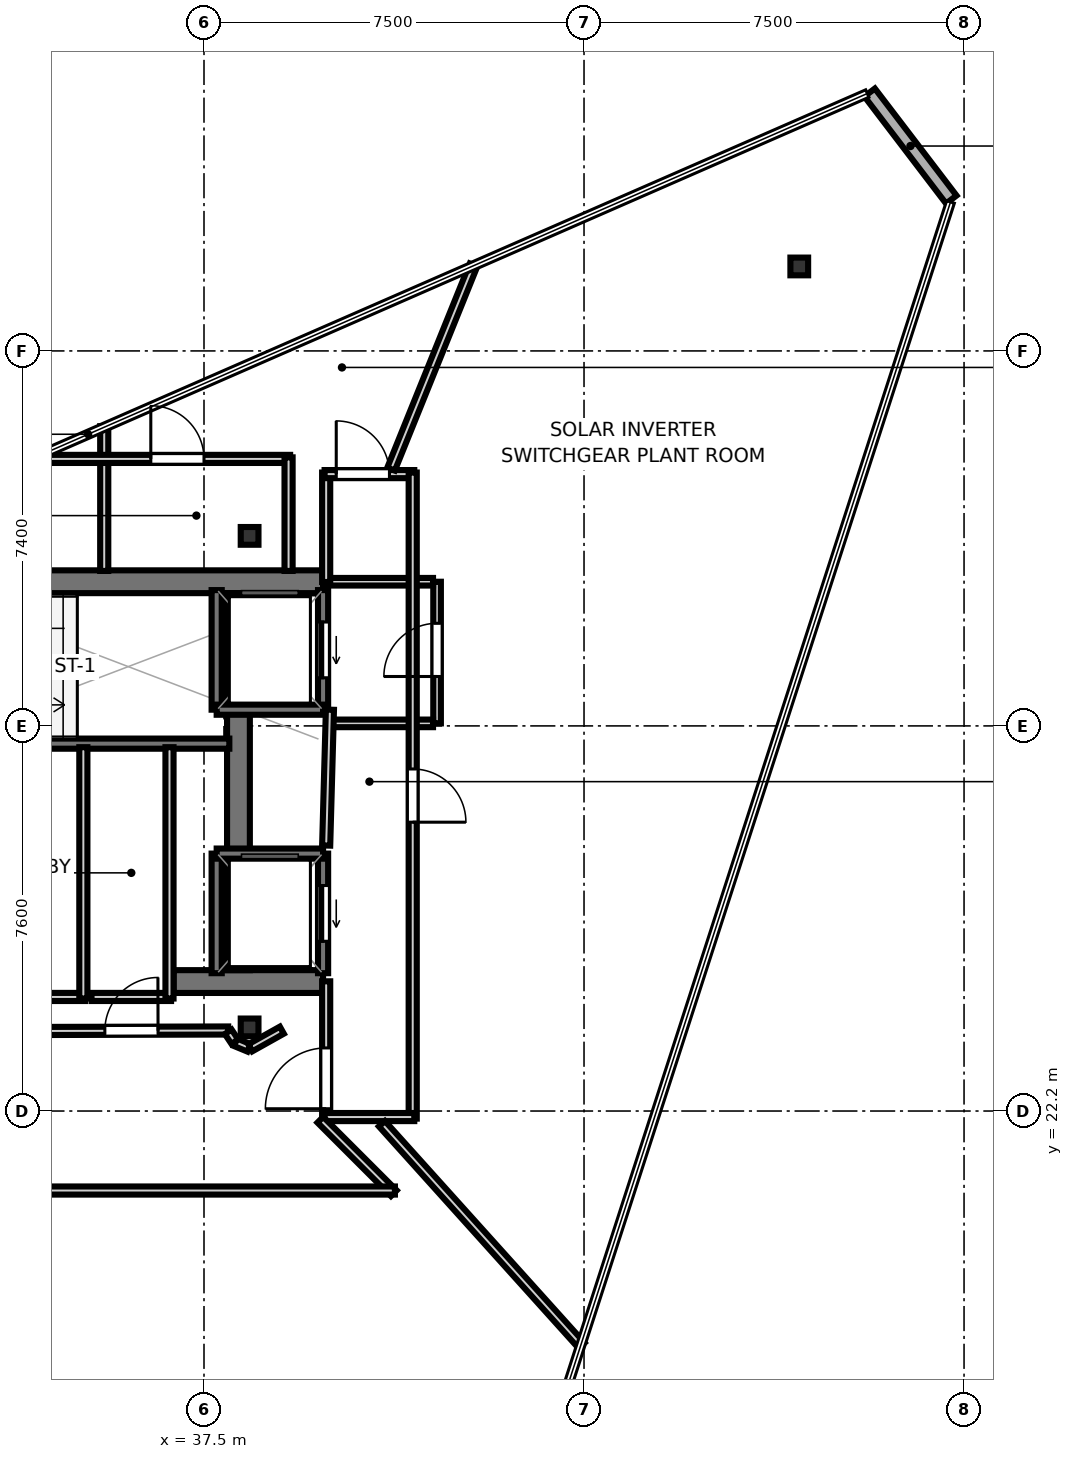
"""IFC4 building model, lengths in metres.
Left out: names, types, materials, properties, quantities, classifications, styles, units other than length and angle.
Written with IfcOpenShell. Run it as: python <this file> out.ifc"""

import sys

from ifc_helpers import new_model, si_unit, direction, frame, frame_2d, origin, origin_2d, place, context, subcontext, project, spatial, rectangle, i_section, extrude, element, fill, save


model = new_model("IFC4")
c1 = context("Model", 3, precision=1e-05, world=origin(), true_north=direction((0.0, 1.0)))
c2 = subcontext(c1, "Body", "Model", "MODEL_VIEW")
j1 = project(units=[si_unit("LENGTHUNIT", "METRE"), si_unit("PLANEANGLEUNIT", "RADIAN")], contexts=[c1])
p1 = place(None, origin())
s1 = spatial("IfcSite", under=j1, at=p1, CompositionType="ELEMENT")
p2 = place(p1, origin())
s2 = spatial("IfcBuilding", under=s1, at=p2, CompositionType="ELEMENT")
p3 = place(p2, frame((0.0, 0.0, 363.8)))
s3 = spatial("IfcBuildingStorey", under=s2, at=p3, CompositionType="ELEMENT", Elevation=363.8)
p4 = place(p3, frame((29.83, 32.645, 0.0), z_axis=(0.0, 0.0, 1.0), x_axis=(1.0, 0.0, 0.0)))
e1 = element("IfcWall", 1, at=p4, inside=s3, PredefinedType="SHEAR", context=c2, shape_type="SweptSolid", body=[
    extrude(rectangle(XDim=10.02, YDim=0.45, at=frame_2d((5.01, 0.0))), origin(), (0.0, 0.0, 1.0), 3.55),
])
p5 = place(p3, frame((36.9, 24.755, 0.0), z_axis=(0.0, 0.0, 1.0), x_axis=(1.0, 0.0, 0.0)))
e2 = element("IfcWall", 2, at=p5, inside=s3, PredefinedType="SHEAR", context=c2, shape_type="SweptSolid", body=[
    extrude(rectangle(XDim=2.95, YDim=0.45, at=frame_2d((1.475, 0.0))), origin(), (0.0, 0.0, 1.0), 3.55),
])
p6 = place(p3, frame((38.18, 24.98, 0.0), z_axis=(0.0, 0.0, 1.0), x_axis=(0.0, 1.0, 0.0)))
e3 = element("IfcWall", 3, at=p6, inside=s3, PredefinedType="SHEAR", context=c2, shape_type="SweptSolid", body=[
    extrude(rectangle(XDim=7.44, YDim=0.45, at=frame_2d((3.72, 0.0))), origin(), (0.0, 0.0, 1.0), 3.55),
])
for number, where, z_axis, x_axis in (
    (4, (38.4, 33.55, 0.0), (0.0, 0.0, 1.0), (1.0, 0.0, 0.0)),
    (5, (38.4, 23.85, 0.0), (0.0, 0.0, 1.0), (1.0, 0.0, 0.0)),
    (6, (49.248, 38.867, 0.0), (0.0, 0.0, 1.0), (1.0, 0.0, 0.0)),
):
    element("IfcColumn", number, at=place(p3, frame(where, z_axis=z_axis, x_axis=x_axis)), inside=s3, PredefinedType="COLUMN", context=c2, shape_type="SweptSolid", body=[
        extrude(i_section(OverallWidth=0.35, OverallDepth=0.35, WebThickness=0.012, FlangeThickness=0.019, at=origin_2d()), origin(), (0.0, 0.0, 1.0), 3.75),
    ])
p7 = place(p3, frame((52.248, 40.187, 0.0), z_axis=(0.0, 0.0, 1.0), x_axis=(-0.606477726375, 0.795100476299, 0.0)))
e7 = element("IfcWall", 7, at=p7, inside=s3, PredefinedType="SOLIDWALL", context=c2, shape_type="SweptSolid", body=[
    extrude(rectangle(XDim=2.657, YDim=0.26, at=frame_2d((1.329, 0.0))), origin(), (0.0, 0.0, 1.0), 3.55),
])
p8 = place(p3, frame((29.7, 29.45, 0.0), z_axis=(0.0, 0.0, 1.0), x_axis=(1.0, 0.0, 0.0)))
e8 = element("IfcWall", 8, at=p8, inside=s3, PredefinedType="SOLIDWALL", context=c2, shape_type="SweptSolid", body=[
    extrude(rectangle(XDim=8.3, YDim=0.2, at=frame_2d((4.15, 0.0))), origin(), (0.0, 0.0, 1.0), 3.55),
])
p9 = place(p8, frame((0.595, 0.0, 0.0)))
e9 = element("IfcOpeningElement", 9, at=p9, cuts=e8, PredefinedType="OPENING", context=c2, shape_type="SweptSolid", body=[
    extrude(rectangle(XDim=1.25, YDim=2.15, at=frame_2d((0.625, 1.075))), frame((0.0, 0.11, 0.0), z_axis=(0.0, -1.0, 0.0), x_axis=(1.0, 0.0, 0.0)), (0.0, 0.0, 1.0), 0.22),
])
p10 = place(p3, frame((39.85, 30.12, 0.0), z_axis=(0.0, 0.0, 1.0), x_axis=(0.0, 1.0, 0.0)))
e10 = element("IfcWall", 10, at=p10, inside=s3, PredefinedType="SOLIDWALL", context=c2, shape_type="SweptSolid", body=[
    extrude(rectangle(XDim=2.36, YDim=0.2, at=frame_2d((1.18, 0.0))), origin(), (0.0, 0.0, 1.0), 3.55),
])
p11 = place(p10, frame((0.63, 0.0, 0.0)))
e11 = element("IfcOpeningElement", 11, at=p11, cuts=e10, PredefinedType="OPENING", context=c2, shape_type="SweptSolid", body=[
    extrude(rectangle(XDim=1.1, YDim=2.15, at=frame_2d((0.55, 1.075))), frame((0.0, 0.11, 0.0), z_axis=(0.0, -1.0, 0.0), x_axis=(1.0, 0.0, 0.0)), (0.0, 0.0, 1.0), 0.22),
])
p12 = place(p3, frame((37.75, 30.12, 0.0), z_axis=(0.0, 0.0, 1.0), x_axis=(0.0, 1.0, 0.0)))
e12 = element("IfcWall", 12, at=p12, inside=s3, PredefinedType="SOLIDWALL", context=c2, shape_type="SweptSolid", body=[
    extrude(rectangle(XDim=2.36, YDim=0.2, at=frame_2d((1.18, 0.0))), origin(), (0.0, 0.0, 1.0), 3.55),
])
p13 = place(p3, frame((37.75, 30.12, 0.0), z_axis=(0.0, 0.0, 1.0), x_axis=(1.0, 0.0, 0.0)))
e13 = element("IfcWall", 13, at=p13, inside=s3, PredefinedType="SOLIDWALL", context=c2, shape_type="SweptSolid", body=[
    extrude(rectangle(XDim=2.1, YDim=0.2, at=frame_2d((1.05, 0.0))), origin(), (0.0, 0.0, 1.0), 3.55),
])
p14 = place(p3, frame((39.85, 24.92, 0.0), z_axis=(0.0, 0.0, 1.0), x_axis=(0.0, 1.0, 0.0)))
e14 = element("IfcWall", 14, at=p14, inside=s3, PredefinedType="SOLIDWALL", context=c2, shape_type="SweptSolid", body=[
    extrude(rectangle(XDim=2.36, YDim=0.2, at=frame_2d((1.18, 0.0))), origin(), (0.0, 0.0, 1.0), 3.55),
])
p15 = place(p14, frame((0.63, 0.0, 0.0)))
e15 = element("IfcOpeningElement", 15, at=p15, cuts=e14, PredefinedType="OPENING", context=c2, shape_type="SweptSolid", body=[
    extrude(rectangle(XDim=1.1, YDim=2.15, at=frame_2d((0.55, 1.075))), frame((0.0, 0.11, 0.0), z_axis=(0.0, -1.0, 0.0), x_axis=(1.0, 0.0, 0.0)), (0.0, 0.0, 1.0), 0.22),
])
p16 = place(p3, frame((37.75, 24.92, 0.0), z_axis=(0.0, 0.0, 1.0), x_axis=(0.0, 1.0, 0.0)))
e16 = element("IfcWall", 16, at=p16, inside=s3, PredefinedType="SOLIDWALL", context=c2, shape_type="SweptSolid", body=[
    extrude(rectangle(XDim=2.36, YDim=0.2, at=frame_2d((1.18, 0.0))), origin(), (0.0, 0.0, 1.0), 3.55),
])
p17 = place(p3, frame((37.75, 27.28, 0.0), z_axis=(0.0, 0.0, 1.0), x_axis=(1.0, 0.0, 0.0)))
e17 = element("IfcWall", 17, at=p17, inside=s3, PredefinedType="SOLIDWALL", context=c2, shape_type="SweptSolid", body=[
    extrude(rectangle(XDim=2.1, YDim=0.2, at=frame_2d((1.05, 0.0))), origin(), (0.0, 0.0, 1.0), 3.55),
])
p18 = place(p3, frame((42.1, 29.85, 0.0), z_axis=(0.0, 0.0, 1.0), x_axis=(0.0, 1.0, 0.0)))
e18 = element("IfcWall", 18, at=p18, inside=s3, PredefinedType="PARTITIONING", context=c2, shape_type="SweptSolid", body=[
    extrude(rectangle(XDim=2.795, YDim=0.15, at=frame_2d((1.397, 0.0))), origin(), (0.0, 0.0, 1.0), 2.87),
])
p19 = place(p18, frame((0.925, 0.0, 0.0)))
e19 = element("IfcOpeningElement", 19, at=p19, cuts=e18, PredefinedType="OPENING", context=c2, shape_type="SweptSolid", body=[
    extrude(rectangle(XDim=1.05, YDim=2.15, at=frame_2d((0.525, 1.075))), frame((0.0, 0.085, 0.0), z_axis=(0.0, -1.0, 0.0), x_axis=(1.0, 0.0, 0.0)), (0.0, 0.0, 1.0), 0.17),
])
for number, where, z_axis, x_axis in (
    (20, (39.96, 29.85, 0.0), (0.0, 0.0, 1.0), (1.0, 0.0, 0.0)),
    (21, (39.96, 32.645, 0.0), (0.0, 0.0, 1.0), (1.0, 0.0, 0.0)),
):
    element("IfcWall", number, at=place(p3, frame(where, z_axis=z_axis, x_axis=x_axis)), inside=s3, PredefinedType="PARTITIONING", context=c2, shape_type="SweptSolid", body=[
        extrude(rectangle(XDim=2.06, YDim=0.15, at=frame_2d((1.03, 0.0))), origin(), (0.0, 0.0, 1.0), 2.87),
    ])
p20 = place(p3, frame((35.15, 24.451, 0.0), z_axis=(0.0, 0.0, 1.0), x_axis=(-1.0, 0.0, 0.0)))
e22 = element("IfcWall", 22, at=p20, inside=s3, PredefinedType="PARTITIONING", context=c2, shape_type="SweptSolid", body=[
    extrude(rectangle(XDim=5.55, YDim=0.16, at=frame_2d((2.775, 0.0))), origin(), (0.0, 0.0, 1.0), 2.87),
])
p21 = place(p3, frame((35.119, 29.38, 0.0), z_axis=(0.0, 0.0, 1.0), x_axis=(0.0, -1.0, 0.0)))
e23 = element("IfcWall", 23, at=p21, inside=s3, PredefinedType="PARTITIONING", context=c2, shape_type="SweptSolid", body=[
    extrude(rectangle(XDim=4.96, YDim=0.16, at=frame_2d((2.48, 0.0))), origin(), (0.0, 0.0, 1.0), 2.08),
])
p22 = place(p3, frame((39.911, 22.05, 0.0), z_axis=(0.0, 0.0, 1.0), x_axis=(0.0, 1.0, 0.0)))
e24 = element("IfcWall", 24, at=p22, inside=s3, PredefinedType="PARTITIONING", context=c2, shape_type="SweptSolid", body=[
    extrude(rectangle(XDim=2.71, YDim=0.16, at=frame_2d((1.355, 0.0))), origin(), (0.0, 0.0, 1.0), 2.87),
])
p23 = place(p22, frame((0.195, 0.0, 0.0)))
e25 = element("IfcOpeningElement", 25, at=p23, cuts=e24, PredefinedType="OPENING", context=c2, shape_type="SweptSolid", body=[
    extrude(rectangle(XDim=1.2, YDim=2.15, at=frame_2d((0.6, 1.075))), frame((0.0, 0.09, 0.0), z_axis=(0.0, -1.0, 0.0), x_axis=(1.0, 0.0, 0.0)), (0.0, 0.0, 1.0), 0.18),
])
p24 = place(p3, frame((39.911, 27.439, 0.0), z_axis=(0.0, 0.0, 1.0), x_axis=(0.027673579092, 0.999617013171, 0.0)))
e26 = element("IfcWall", 26, at=p24, inside=s3, PredefinedType="PARTITIONING", context=c2, shape_type="SweptSolid", body=[
    extrude(rectangle(XDim=2.682, YDim=0.16, at=frame_2d((1.341, 0.0))), origin(), (0.0, 0.0, 1.0), 2.87),
])
p25 = place(p3, frame((39.911, 32.64, 0.0), z_axis=(0.0, 0.0, 1.0), x_axis=(0.0, 1.0, 0.0)))
e27 = element("IfcWall", 27, at=p25, inside=s3, PredefinedType="PARTITIONING", context=c2, shape_type="SweptSolid", body=[
    extrude(rectangle(XDim=2.16, YDim=0.16, at=frame_2d((1.08, 0.0))), origin(), (0.0, 0.0, 1.0), 2.87),
])
p26 = place(p3, frame((39.88, 34.769, 0.0), z_axis=(0.0, 0.0, 1.0), x_axis=(1.0, 0.0, 0.0)))
e28 = element("IfcWall", 28, at=p26, inside=s3, PredefinedType="PARTITIONING", context=c2, shape_type="SweptSolid", body=[
    extrude(rectangle(XDim=1.77, YDim=0.16, at=frame_2d((0.885, 0.0))), origin(), (0.0, 0.0, 1.0), 2.87),
])
p27 = place(p26, frame((0.23, 0.0, 0.0)))
e29 = element("IfcOpeningElement", 29, at=p27, cuts=e28, PredefinedType="OPENING", context=c2, shape_type="SweptSolid", body=[
    extrude(rectangle(XDim=1.05, YDim=2.15, at=frame_2d((0.525, 1.075))), frame((0.0, 0.09, 0.0), z_axis=(0.0, -1.0, 0.0), x_axis=(1.0, 0.0, 0.0)), (0.0, 0.0, 1.0), 0.18),
])
p28 = place(p3, frame((41.619, 34.8, 0.0), z_axis=(0.0, 0.0, 1.0), x_axis=(0.0, -1.0, 0.0)))
e30 = element("IfcWall", 30, at=p28, inside=s3, PredefinedType="PARTITIONING", context=c2, shape_type="SweptSolid", body=[
    extrude(rectangle(XDim=12.75, YDim=0.16, at=frame_2d((6.375, 0.0))), origin(), (0.0, 0.0, 1.0), 2.87),
])
p29 = place(p28, frame((5.85, 0.0, 0.0)))
e31 = element("IfcOpeningElement", 31, at=p29, cuts=e30, PredefinedType="OPENING", context=c2, shape_type="SweptSolid", body=[
    extrude(rectangle(XDim=1.05, YDim=2.15, at=frame_2d((0.525, 1.075))), frame((0.0, 0.09, 0.0), z_axis=(0.0, -1.0, 0.0), x_axis=(1.0, 0.0, 0.0)), (0.0, 0.0, 1.0), 0.18),
])
p30 = place(p3, frame((41.65, 22.081, 0.0), z_axis=(0.0, 0.0, 1.0), x_axis=(-1.0, 0.0, 0.0)))
e32 = element("IfcWall", 32, at=p30, inside=s3, PredefinedType="PARTITIONING", context=c2, shape_type="SweptSolid", body=[
    extrude(rectangle(XDim=1.77, YDim=0.16, at=frame_2d((0.885, 0.0))), origin(), (0.0, 0.0, 1.0), 2.87),
])
p31 = place(p3, frame((36.85, 24.451, 0.0), z_axis=(0.0, 0.0, 1.0), x_axis=(-1.0, 0.0, 0.0)))
e33 = element("IfcWall", 33, at=p31, inside=s3, PredefinedType="PARTITIONING", context=c2, shape_type="SweptSolid", body=[
    extrude(rectangle(XDim=1.57, YDim=0.16, at=frame_2d((0.785, 0.0))), origin(), (0.0, 0.0, 1.0), 2.87),
])
p32 = place(p3, frame((36.819, 29.38, 0.0), z_axis=(0.0, 0.0, 1.0), x_axis=(0.0, -1.0, 0.0)))
e34 = element("IfcWall", 34, at=p32, inside=s3, PredefinedType="PARTITIONING", context=c2, shape_type="SweptSolid", body=[
    extrude(rectangle(XDim=4.96, YDim=0.16, at=frame_2d((2.48, 0.0))), origin(), (0.0, 0.0, 1.0), 2.87),
])
p33 = place(p3, frame((35.531, 32.858, 0.0), z_axis=(0.0, 0.0, 1.0), x_axis=(0.0, 1.0, 0.0)))
e35 = element("IfcWall", 35, at=p33, inside=s3, PredefinedType="PARTITIONING", context=c2, shape_type="SweptSolid", body=[
    extrude(rectangle(XDim=2.856, YDim=0.16, at=frame_2d((1.428, 0.0))), origin(), (0.0, 0.0, 1.0), 2.87),
])
p34 = place(p3, frame((34.081, 35.069, 0.0), z_axis=(0.0, 0.0, 1.0), x_axis=(1.0, 0.0, 0.0)))
e36 = element("IfcWall", 36, at=p34, inside=s3, PredefinedType="PARTITIONING", context=c2, shape_type="SweptSolid", body=[
    extrude(rectangle(XDim=5.119, YDim=0.16, at=frame_2d((2.56, 0.0))), origin(), (0.0, 0.0, 1.0), 2.87),
])
p35 = place(p34, frame((2.369, 0.0, 0.0)))
e37 = element("IfcOpeningElement", 37, at=p35, cuts=e36, PredefinedType="OPENING", context=c2, shape_type="SweptSolid", body=[
    extrude(rectangle(XDim=1.05, YDim=2.15, at=frame_2d((0.525, 1.075))), frame((0.0, 0.09, 0.0), z_axis=(0.0, -1.0, 0.0), x_axis=(1.0, 0.0, 0.0)), (0.0, 0.0, 1.0), 0.18),
])
p36 = place(p3, frame((39.169, 35.1, 0.0), z_axis=(0.0, 0.0, 1.0), x_axis=(0.0, -1.0, 0.0)))
e38 = element("IfcWall", 38, at=p36, inside=s3, PredefinedType="PARTITIONING", context=c2, shape_type="SweptSolid", body=[
    extrude(rectangle(XDim=2.242, YDim=0.16, at=frame_2d((1.121, 0.0))), origin(), (0.0, 0.0, 1.0), 2.87),
])
p37 = place(p3, frame((29.184, 23.767, 0.0), z_axis=(0.0, 0.0, 1.0), x_axis=(0.999996878137, 0.002498742824, 0.0)))
e39 = element("IfcWall", 39, at=p37, inside=s3, PredefinedType="PARTITIONING", context=c2, shape_type="SweptSolid", body=[
    extrude(rectangle(XDim=8.793, YDim=0.16, at=frame_2d((4.397, 0.0))), origin(), (0.0, 0.0, 1.0), 2.87),
])
p38 = place(p37, frame((2.831, 0.0, 0.0)))
e40 = element("IfcOpeningElement", 40, at=p38, cuts=e39, PredefinedType="OPENING", context=c2, shape_type="SweptSolid", body=[
    extrude(rectangle(XDim=1.2, YDim=2.15, at=frame_2d((0.6, 1.075))), frame((0.0, 0.09, 0.0), z_axis=(0.0, -1.0, 0.0), x_axis=(1.0, 0.0, 0.0)), (0.0, 0.0, 1.0), 0.18),
])
p39 = place(p37, frame((6.359, 0.0, 0.0)))
e41 = element("IfcOpeningElement", 41, at=p39, cuts=e39, PredefinedType="OPENING", context=c2, shape_type="SweptSolid", body=[
    extrude(rectangle(XDim=1.05, YDim=2.15, at=frame_2d((0.525, 1.075))), frame((0.0, 0.09, 0.0), z_axis=(0.0, -1.0, 0.0), x_axis=(1.0, 0.0, 0.0)), (0.0, 0.0, 1.0), 0.18),
])
p40 = place(p37, frame((1.431, 0.0, 0.0)))
e42 = element("IfcOpeningElement", 42, at=p40, cuts=e39, PredefinedType="OPENING", context=c2, shape_type="SweptSolid", body=[
    extrude(rectangle(XDim=1.2, YDim=2.15, at=frame_2d((0.6, 1.075))), frame((0.0, 0.09, 0.0), z_axis=(0.0, -1.0, 0.0), x_axis=(1.0, 0.0, 0.0)), (0.0, 0.0, 1.0), 0.18),
])
p41 = place(p3, frame((37.978, 23.764, 0.0), z_axis=(0.0, 0.0, 1.0), x_axis=(0.556130652598, -0.831094878604, 0.0)))
e43 = element("IfcWall", 43, at=p41, inside=s3, PredefinedType="PARTITIONING", context=c2, shape_type="SweptSolid", body=[
    extrude(rectangle(XDim=0.236, YDim=0.16, at=frame_2d((0.118, 0.0))), origin(), (0.0, 0.0, 1.0), 2.87),
])
p42 = place(p3, frame((38.123, 23.556, 0.0), z_axis=(0.0, 0.0, 1.0), x_axis=(0.92383017907, -0.382802560388, 0.0)))
e44 = element("IfcWall", 44, at=p42, inside=s3, PredefinedType="PARTITIONING", context=c2, shape_type="SweptSolid", body=[
    extrude(rectangle(XDim=0.287, YDim=0.16, at=frame_2d((0.144, 0.0))), origin(), (0.0, 0.0, 1.0), 2.87),
])
p43 = place(p3, frame((38.415, 23.448, 0.0), z_axis=(0.0, 0.0, 1.0), x_axis=(0.872599584194, 0.488436245241, 0.0)))
e45 = element("IfcWall", 45, at=p43, inside=s3, PredefinedType="PARTITIONING", context=c2, shape_type="SweptSolid", body=[
    extrude(rectangle(XDim=0.712, YDim=0.16, at=frame_2d((0.356, 0.0))), origin(), (0.0, 0.0, 1.0), 2.87),
])
p44 = place(p3, frame((39.796, 22.028, 0.0), z_axis=(0.0, 0.0, 1.0), x_axis=(0.707106781187, -0.707106781187, 0.0)))
e46 = element("IfcWall", 46, at=p44, inside=s3, PredefinedType="PARTITIONING", context=c2, shape_type="SweptSolid", body=[
    extrude(rectangle(XDim=2.051, YDim=0.16, at=frame_2d((1.025, 0.0))), origin(), (0.0, 0.0, 1.0), 2.87),
])
p45 = place(p3, frame((41.268, 20.631, 0.0), z_axis=(0.0, 0.0, 1.0), x_axis=(-1.0, 0.0, 0.0)))
e47 = element("IfcWall", 47, at=p45, inside=s3, PredefinedType="PARTITIONING", context=c2, shape_type="SweptSolid", body=[
    extrude(rectangle(XDim=16.412, YDim=0.16, at=frame_2d((8.206, 0.0))), origin(), (0.0, 0.0, 1.0), 2.87),
])
p46 = place(p45, frame((7.384, 0.0, 0.0)))
e48 = element("IfcOpeningElement", 48, at=p46, cuts=e47, PredefinedType="OPENING", context=c2, shape_type="SweptSolid", body=[
    extrude(rectangle(XDim=1.05, YDim=2.15, at=frame_2d((0.525, 1.075))), frame((0.0, 0.09, 0.0), z_axis=(0.0, -1.0, 0.0), x_axis=(1.0, 0.0, 0.0)), (0.0, 0.0, 1.0), 0.18),
])
p47 = place(p3, frame((41.011, 21.949, 0.0), z_axis=(0.0, 0.0, 1.0), x_axis=(0.669120448738, -0.743153971315, 0.0)))
e49 = element("IfcWall", 49, at=p47, inside=s3, PredefinedType="PARTITIONING", context=c2, shape_type="SweptSolid", body=[
    extrude(rectangle(XDim=5.89, YDim=0.16, at=frame_2d((2.945, 0.0))), origin(), (0.0, 0.0, 1.0), 2.87),
])
p48 = place(p3, frame((41.192, 34.868, 0.0), z_axis=(0.0, 0.0, 1.0), x_axis=(0.374633996442, 0.927172782555, 0.0)))
e50 = element("IfcWall", 50, at=p48, inside=s3, PredefinedType="PARTITIONING", context=c2, shape_type="SweptSolid", body=[
    extrude(rectangle(XDim=4.345, YDim=0.16, at=frame_2d((2.172, 0.0))), origin(), (0.0, 0.0, 1.0), 2.87),
])
p49 = place(p11, origin())
e51 = element("IfcDoor", 51, at=p49, inside=s3, OperationType="SLIDING_TO_LEFT", PredefinedType="DOOR", context=c2, shape_type="SweptSolid", body=[
    extrude(rectangle(XDim=1.1, YDim=2.15, at=frame_2d((0.55, 1.075))), frame((0.0, 0.025, 0.0), z_axis=(0.0, -1.0, 0.0), x_axis=(1.0, 0.0, 0.0)), (0.0, 0.0, 1.0), 0.05),
])
fill(e11, e51)
p50 = place(p15, origin())
e52 = element("IfcDoor", 52, at=p50, inside=s3, OperationType="SLIDING_TO_LEFT", PredefinedType="DOOR", context=c2, shape_type="SweptSolid", body=[
    extrude(rectangle(XDim=1.1, YDim=2.15, at=frame_2d((0.55, 1.075))), frame((0.0, 0.025, 0.0), z_axis=(0.0, -1.0, 0.0), x_axis=(1.0, 0.0, 0.0)), (0.0, 0.0, 1.0), 0.05),
])
fill(e15, e52)
p51 = place(p19, origin())
e53 = element("IfcDoor", 53, at=p51, inside=s3, OperationType="SINGLE_SWING_LEFT", PredefinedType="DOOR", context=c2, shape_type="SweptSolid", body=[
    extrude(rectangle(XDim=1.05, YDim=2.15, at=frame_2d((0.525, 1.075))), frame((0.0, 0.025, 0.0), z_axis=(0.0, -1.0, 0.0), x_axis=(1.0, 0.0, 0.0)), (0.0, 0.0, 1.0), 0.05),
])
fill(e19, e53)
p52 = place(p23, origin())
e54 = element("IfcDoor", 54, at=p52, inside=s3, OperationType="SINGLE_SWING_LEFT", PredefinedType="DOOR", context=c2, shape_type="SweptSolid", body=[
    extrude(rectangle(XDim=1.2, YDim=2.15, at=frame_2d((0.6, 1.075))), frame((0.0, 0.025, 0.0), z_axis=(0.0, -1.0, 0.0), x_axis=(1.0, 0.0, 0.0)), (0.0, 0.0, 1.0), 0.05),
])
fill(e25, e54)
p53 = place(p39, origin())
e55 = element("IfcDoor", 55, at=p53, inside=s3, OperationType="SINGLE_SWING_RIGHT", PredefinedType="DOOR", context=c2, shape_type="SweptSolid", body=[
    extrude(rectangle(XDim=1.05, YDim=2.15, at=frame_2d((0.525, 1.075))), frame((0.0, 0.025, 0.0), z_axis=(0.0, -1.0, 0.0), x_axis=(1.0, 0.0, 0.0)), (0.0, 0.0, 1.0), 0.05),
])
fill(e41, e55)
p54 = place(p29, origin())
e56 = element("IfcDoor", 56, at=p54, inside=s3, OperationType="SINGLE_SWING_RIGHT", PredefinedType="DOOR", context=c2, shape_type="SweptSolid", body=[
    extrude(rectangle(XDim=1.05, YDim=2.15, at=frame_2d((0.525, 1.075))), frame((0.0, 0.025, 0.0), z_axis=(0.0, -1.0, 0.0), x_axis=(1.0, 0.0, 0.0)), (0.0, 0.0, 1.0), 0.05),
])
fill(e31, e56)
p55 = place(p27, origin())
e57 = element("IfcDoor", 57, at=p55, inside=s3, OperationType="SINGLE_SWING_LEFT", PredefinedType="DOOR", context=c2, shape_type="SweptSolid", body=[
    extrude(rectangle(XDim=1.05, YDim=2.15, at=frame_2d((0.525, 1.075))), frame((0.0, 0.025, 0.0), z_axis=(0.0, -1.0, 0.0), x_axis=(1.0, 0.0, 0.0)), (0.0, 0.0, 1.0), 0.05),
])
fill(e29, e57)
p56 = place(p35, origin())
e58 = element("IfcDoor", 58, at=p56, inside=s3, OperationType="SINGLE_SWING_LEFT", PredefinedType="DOOR", context=c2, shape_type="SweptSolid", body=[
    extrude(rectangle(XDim=1.05, YDim=2.15, at=frame_2d((0.525, 1.075))), frame((0.0, 0.025, 0.0), z_axis=(0.0, -1.0, 0.0), x_axis=(1.0, 0.0, 0.0)), (0.0, 0.0, 1.0), 0.05),
])
fill(e37, e58)
save(model, sys.argv[1])
